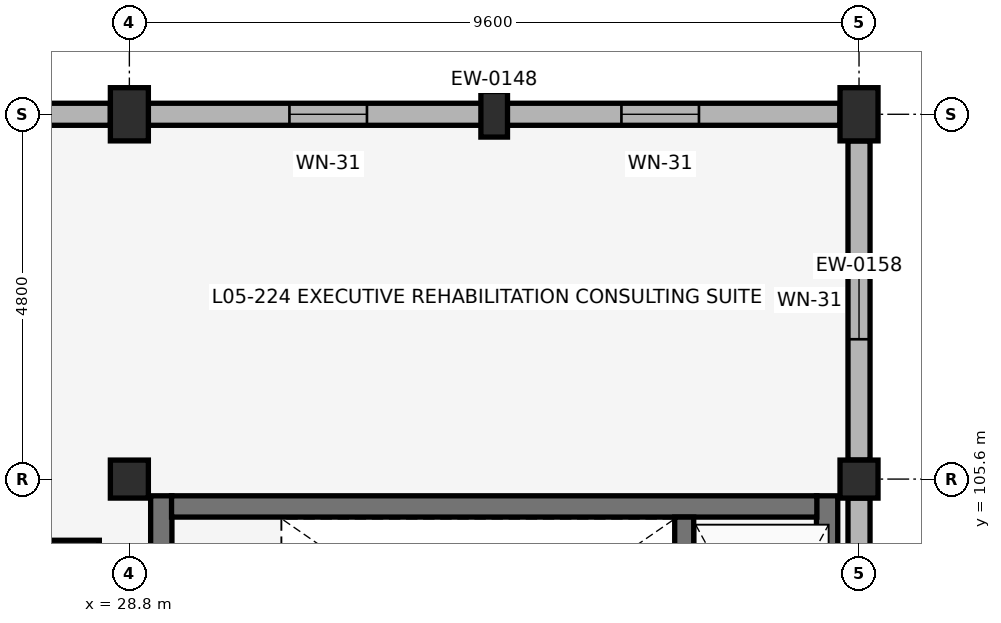
"""IFC4 building model, lengths in metres.
Left out: names, types, materials, properties, quantities, classifications, styles, units other than length and angle.
Written with IfcOpenShell. Run it as: python <this file> out.ifc"""

import sys

from ifc_helpers import new_model, si_unit, direction, frame, frame_2d, origin, origin_2d, place, context, subcontext, project, spatial, rectangle, extrude, element, fill, save


model = new_model("IFC4")
c1 = context("Model", 3, precision=1e-05, world=origin(), true_north=direction((0.0, 1.0)))
c2 = subcontext(c1, "Body", "Model", "MODEL_VIEW")
j1 = project(units=[si_unit("LENGTHUNIT", "METRE"), si_unit("PLANEANGLEUNIT", "RADIAN")], contexts=[c1])
p1 = place(None, origin())
s1 = spatial("IfcSite", under=j1, at=p1, CompositionType="ELEMENT")
p2 = place(p1, origin())
s2 = spatial("IfcBuilding", under=s1, at=p2, CompositionType="ELEMENT")
p3 = place(p2, frame((0.0, 0.0, 20.74)))
s3 = spatial("IfcBuildingStorey", under=s2, at=p3, CompositionType="ELEMENT", Elevation=20.74)
p4 = place(p3, frame((28.8, 105.6, 0.0), z_axis=(0.0, 0.0, 1.0), x_axis=(1.0, 0.0, 0.0)))
e1 = element("IfcColumn", 1, at=p4, inside=s3, PredefinedType="COLUMN", context=c2, shape_type="SweptSolid", body=[
    extrude(rectangle(XDim=0.5, YDim=0.5, at=origin_2d()), origin(), (0.0, 0.0, 1.0), 4.08),
])
p5 = place(p3, frame((28.8, 110.4, 0.0), z_axis=(0.0, 0.0, 1.0), x_axis=(1.0, 0.0, 0.0)))
e2 = element("IfcColumn", 2, at=p5, inside=s3, PredefinedType="COLUMN", context=c2, shape_type="SweptSolid", body=[
    extrude(rectangle(XDim=0.5, YDim=0.7, at=origin_2d()), origin(), (0.0, 0.0, 1.0), 4.08),
])
p6 = place(p3, frame((38.4, 105.6, 0.0), z_axis=(0.0, 0.0, 1.0), x_axis=(1.0, 0.0, 0.0)))
e3 = element("IfcColumn", 3, at=p6, inside=s3, PredefinedType="COLUMN", context=c2, shape_type="SweptSolid", body=[
    extrude(rectangle(XDim=0.5, YDim=0.5, at=origin_2d()), origin(), (0.0, 0.0, 1.0), 4.08),
])
p7 = place(p3, frame((38.4, 110.4, 0.0), z_axis=(0.0, 0.0, 1.0), x_axis=(1.0, 0.0, 0.0)))
e4 = element("IfcColumn", 4, at=p7, inside=s3, PredefinedType="COLUMN", context=c2, shape_type="SweptSolid", body=[
    extrude(rectangle(XDim=0.5, YDim=0.7, at=origin_2d()), origin(), (0.0, 0.0, 1.0), 4.08),
])
p8 = place(p3, frame((33.6, 110.4, 0.0), z_axis=(0.0, 0.0, 1.0), x_axis=(1.0, 0.0, 0.0)))
e5 = element("IfcColumn", 5, at=p8, inside=s3, PredefinedType="PILASTER", context=c2, shape_type="SweptSolid", body=[
    extrude(rectangle(XDim=0.35, YDim=0.6, at=origin_2d()), origin(), (0.0, 0.0, 1.0), 4.08),
])
p9 = place(p3, frame((28.55, 110.4, 0.0), z_axis=(0.0, 0.0, 1.0), x_axis=(-1.0, 0.0, 0.0)))
e6 = element("IfcWall", 6, at=p9, inside=s3, PredefinedType="SOLIDWALL", context=c2, shape_type="SweptSolid", body=[
    extrude(rectangle(XDim=9.1, YDim=0.29, at=frame_2d((4.55, 0.0))), origin(), (0.0, 0.0, 1.0), 3.07),
])
p10 = place(p9, frame((1.765, 0.0, 0.88)))
e7 = element("IfcOpeningElement", 7, at=p10, cuts=e6, PredefinedType="OPENING", context=c2, shape_type="SweptSolid", body=[
    extrude(rectangle(XDim=1.02, YDim=1.88, at=frame_2d((0.51, 0.94))), frame((0.0, 0.155, 0.0), z_axis=(0.0, -1.0, 0.0), x_axis=(1.0, 0.0, 0.0)), (0.0, 0.0, 1.0), 0.31),
])
p11 = place(p9, frame((4.04, 0.0, 0.88)))
e8 = element("IfcOpeningElement", 8, at=p11, cuts=e6, PredefinedType="OPENING", context=c2, shape_type="SweptSolid", body=[
    extrude(rectangle(XDim=1.02, YDim=1.88, at=frame_2d((0.51, 0.94))), frame((0.0, 0.155, 0.0), z_axis=(0.0, -1.0, 0.0), x_axis=(1.0, 0.0, 0.0)), (0.0, 0.0, 1.0), 0.31),
])
p12 = place(p9, frame((6.315, 0.0, 0.88)))
e9 = element("IfcOpeningElement", 9, at=p12, cuts=e6, PredefinedType="OPENING", context=c2, shape_type="SweptSolid", body=[
    extrude(rectangle(XDim=1.02, YDim=1.88, at=frame_2d((0.51, 0.94))), frame((0.0, 0.155, 0.0), z_axis=(0.0, -1.0, 0.0), x_axis=(1.0, 0.0, 0.0)), (0.0, 0.0, 1.0), 0.31),
])
p13 = place(p3, frame((38.15, 110.4, 0.0), z_axis=(0.0, 0.0, 1.0), x_axis=(-1.0, 0.0, 0.0)))
e10 = element("IfcWall", 10, at=p13, inside=s3, PredefinedType="SOLIDWALL", context=c2, shape_type="SweptSolid", body=[
    extrude(rectangle(XDim=9.1, YDim=0.29, at=frame_2d((4.55, 0.0))), origin(), (0.0, 0.0, 1.0), 3.07),
])
p14 = place(p13, frame((1.856, 0.0, 0.88)))
e11 = element("IfcOpeningElement", 11, at=p14, cuts=e10, PredefinedType="OPENING", context=c2, shape_type="SweptSolid", body=[
    extrude(rectangle(XDim=1.02, YDim=1.88, at=frame_2d((0.51, 0.94))), frame((0.0, 0.155, 0.0), z_axis=(0.0, -1.0, 0.0), x_axis=(1.0, 0.0, 0.0)), (0.0, 0.0, 1.0), 0.31),
])
p15 = place(p13, frame((6.224, 0.0, 0.88)))
e12 = element("IfcOpeningElement", 12, at=p15, cuts=e10, PredefinedType="OPENING", context=c2, shape_type="SweptSolid", body=[
    extrude(rectangle(XDim=1.02, YDim=1.88, at=frame_2d((0.51, 0.94))), frame((0.0, 0.155, 0.0), z_axis=(0.0, -1.0, 0.0), x_axis=(1.0, 0.0, 0.0)), (0.0, 0.0, 1.0), 0.31),
])
p16 = place(p3, frame((38.4, 98.65, 0.0), z_axis=(0.0, 0.0, 1.0), x_axis=(0.0, 1.0, 0.0)))
e13 = element("IfcWall", 13, at=p16, inside=s3, PredefinedType="SOLIDWALL", context=c2, shape_type="SweptSolid", body=[
    extrude(rectangle(XDim=6.7, YDim=0.29, at=frame_2d((3.35, 0.0))), origin(), (0.0, 0.0, 1.0), 3.07),
])
p17 = place(p3, frame((38.4, 105.85, 0.0), z_axis=(0.0, 0.0, 1.0), x_axis=(0.0, 1.0, 0.0)))
e14 = element("IfcWall", 14, at=p17, inside=s3, PredefinedType="SOLIDWALL", context=c2, shape_type="SweptSolid", body=[
    extrude(rectangle(XDim=4.2, YDim=0.29, at=frame_2d((2.1, 0.0))), origin(), (0.0, 0.0, 1.0), 3.07),
])
p18 = place(p17, frame((1.59, 0.0, 0.88)))
e15 = element("IfcOpeningElement", 15, at=p18, cuts=e14, PredefinedType="OPENING", context=c2, shape_type="SweptSolid", body=[
    extrude(rectangle(XDim=1.02, YDim=1.88, at=frame_2d((0.51, 0.94))), frame((0.0, 0.155, 0.0), z_axis=(0.0, -1.0, 0.0), x_axis=(1.0, 0.0, 0.0)), (0.0, 0.0, 1.0), 0.31),
])
for number, where, z_axis, x_axis in (
    (16, (29.22, 101.3, 0.0), (0.0, 0.0, 1.0), (0.0, 1.0, 0.0)),
    (17, (37.98, 101.3, 0.0), (0.0, 0.0, 1.0), (0.0, 1.0, 0.0)),
):
    element("IfcWall", number, at=place(p3, frame(where, z_axis=z_axis, x_axis=x_axis)), inside=s3, PredefinedType="SHEAR", context=c2, shape_type="SweptSolid", body=[
        extrude(rectangle(XDim=4.08, YDim=0.28, at=frame_2d((2.04, 0.0))), origin(), (0.0, 0.0, 1.0), 3.8),
    ])
p19 = place(p3, frame((29.355, 105.24, 0.0), z_axis=(0.0, 0.0, 1.0), x_axis=(1.0, 0.0, 0.0)))
e18 = element("IfcWall", 18, at=p19, inside=s3, PredefinedType="SHEAR", context=c2, shape_type="SweptSolid", body=[
    extrude(rectangle(XDim=8.49, YDim=0.28, at=frame_2d((4.245, 0.0))), origin(), (0.0, 0.0, 1.0), 3.8),
])
p20 = place(p3, frame((36.1, 101.56, 0.0), z_axis=(0.0, 0.0, 1.0), x_axis=(0.0, 1.0, 0.0)))
e19 = element("IfcWall", 19, at=p20, inside=s3, PredefinedType="SHEAR", context=c2, shape_type="SweptSolid", body=[
    extrude(rectangle(XDim=3.54, YDim=0.25, at=frame_2d((1.77, 0.0))), origin(), (0.0, 0.0, 1.0), 3.8),
])
p21 = place(p3, frame((24.197, 104.71, 0.0), z_axis=(0.0, 0.0, 1.0), x_axis=(1.0, 0.0, 0.0)))
e20 = element("IfcWall", 20, at=p21, inside=s3, PredefinedType="PLUMBINGWALL", context=c2, shape_type="SweptSolid", body=[
    extrude(rectangle(XDim=4.208, YDim=0.17, at=frame_2d((2.104, 0.0))), origin(), (0.0, 0.0, 1.0), 3.12),
])
p22 = place(p14, origin())
e21 = element("IfcWindow", 21, at=p22, inside=s3, PartitioningType="SINGLE_PANEL", PredefinedType="WINDOW", context=c2, shape_type="SweptSolid", body=[
    extrude(rectangle(XDim=1.02, YDim=1.88, at=frame_2d((0.51, 0.94))), frame((0.0, 0.03, 0.0), z_axis=(0.0, -1.0, 0.0), x_axis=(1.0, 0.0, 0.0)), (0.0, 0.0, 1.0), 0.06),
])
fill(e11, e21)
p23 = place(p15, origin())
e22 = element("IfcWindow", 22, at=p23, inside=s3, PartitioningType="SINGLE_PANEL", PredefinedType="WINDOW", context=c2, shape_type="SweptSolid", body=[
    extrude(rectangle(XDim=1.02, YDim=1.88, at=frame_2d((0.51, 0.94))), frame((0.0, 0.03, 0.0), z_axis=(0.0, -1.0, 0.0), x_axis=(1.0, 0.0, 0.0)), (0.0, 0.0, 1.0), 0.06),
])
fill(e12, e22)
p24 = place(p18, origin())
e23 = element("IfcWindow", 23, at=p24, inside=s3, PartitioningType="SINGLE_PANEL", PredefinedType="WINDOW", context=c2, shape_type="SweptSolid", body=[
    extrude(rectangle(XDim=1.02, YDim=1.88, at=frame_2d((0.51, 0.94))), frame((0.0, 0.03, 0.0), z_axis=(0.0, -1.0, 0.0), x_axis=(1.0, 0.0, 0.0)), (0.0, 0.0, 1.0), 0.06),
])
fill(e15, e23)
save(model, sys.argv[1])
